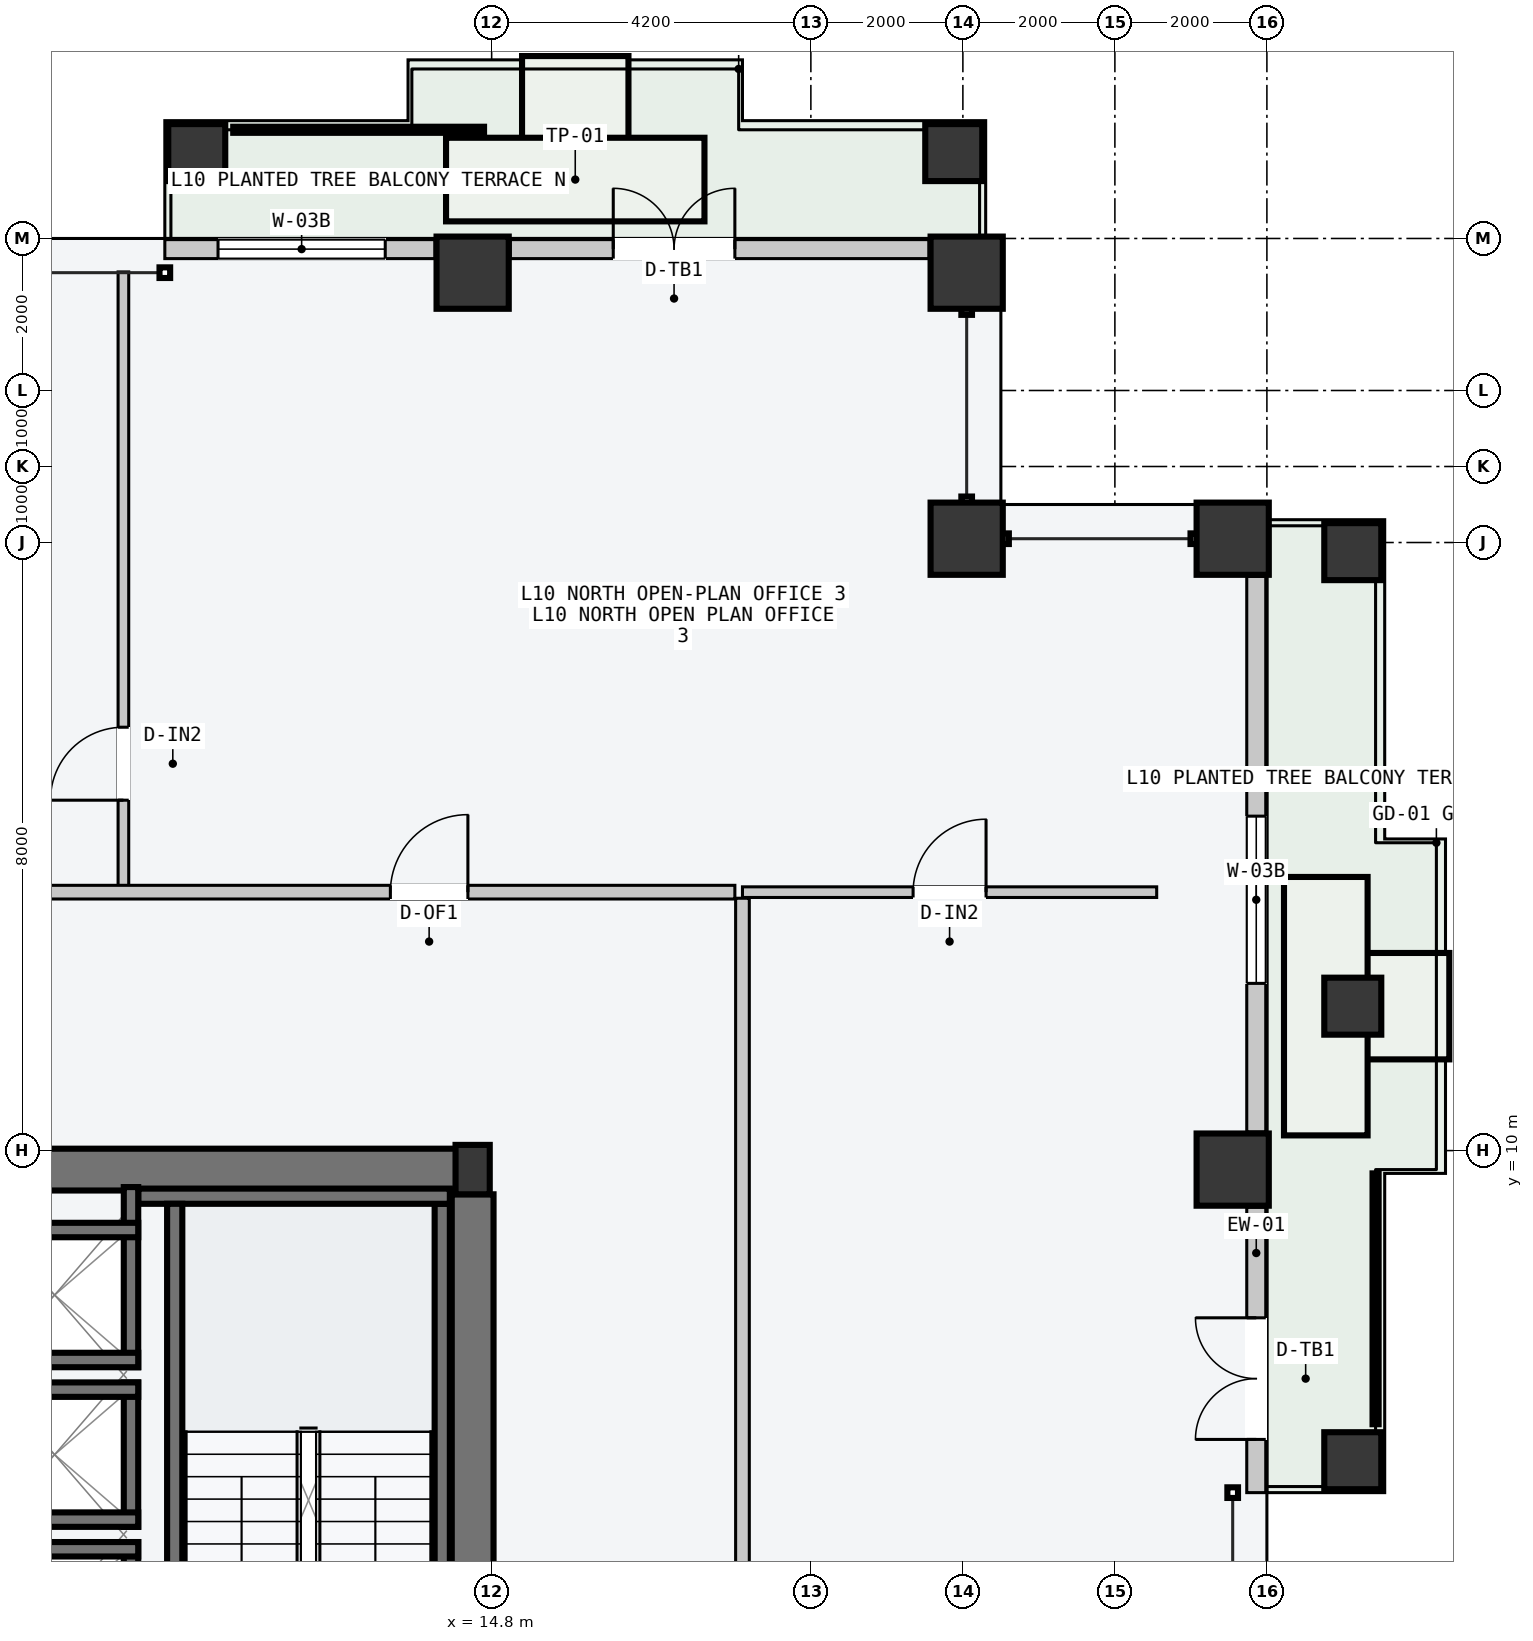
"""IFC4 building model, lengths in metres.
Left out: names, types, materials, properties, quantities, classifications, styles, units other than length and angle.
Written with IfcOpenShell. Run it as: python <this file> out.ifc"""

import sys

from ifc_helpers import new_model, si_unit, direction, frame, frame_2d, origin, origin_2d, place, context, subcontext, project, spatial, rectangle, hollow_rectangle, i_section, extrude, element, fill, save


model = new_model("IFC4")
c1 = context("Model", 3, precision=1e-05, world=origin(), true_north=direction((0.0, 1.0)))
c2 = subcontext(c1, "Body", "Model", "MODEL_VIEW")
j1 = project(units=[si_unit("LENGTHUNIT", "METRE"), si_unit("PLANEANGLEUNIT", "RADIAN")], contexts=[c1])
p1 = place(None, origin())
s1 = spatial("IfcSite", under=j1, at=p1, CompositionType="ELEMENT")
p2 = place(p1, origin())
s2 = spatial("IfcBuilding", under=s1, at=p2, CompositionType="ELEMENT")
p3 = place(p2, frame((0.0, 0.0, 42.0)))
s3 = spatial("IfcBuildingStorey", under=s2, at=p3, CompositionType="ELEMENT", Elevation=42.0)
p4 = place(p3, frame((8.07, 9.75, -0.2), z_axis=(0.0, 0.0, 1.0), x_axis=(1.0, 0.0, 0.0)))
e1 = element("IfcWall", 1, at=p4, inside=s3, PredefinedType="SHEAR", context=c2, shape_type="SweptSolid", body=[
    extrude(rectangle(XDim=6.46, YDim=0.55, at=frame_2d((3.23, 0.0))), origin(), (0.0, 0.0, 1.0), 3.6),
])
p5 = place(p3, frame((14.55, 0.325, -0.2), z_axis=(0.0, 0.0, 1.0), x_axis=(0.0, 1.0, 0.0)))
e2 = element("IfcWall", 2, at=p5, inside=s3, PredefinedType="SHEAR", context=c2, shape_type="SweptSolid", body=[
    extrude(rectangle(XDim=9.1, YDim=0.55, at=frame_2d((4.55, 0.0))), origin(), (0.0, 0.0, 1.0), 3.6),
])
p6 = place(p3, frame((14.15, 1.5, -0.2), z_axis=(0.0, 0.0, 1.0), x_axis=(0.0, 1.0, 0.0)))
e3 = element("IfcWall", 3, at=p6, inside=s3, PredefinedType="SOLIDWALL", context=c2, shape_type="SweptSolid", body=[
    extrude(rectangle(XDim=7.8, YDim=0.2, at=frame_2d((3.9, 0.0))), origin(), (0.0, 0.0, 1.0), 3.6),
])
p7 = place(p3, frame((10.15, 9.4, -0.2), z_axis=(0.0, 0.0, 1.0), x_axis=(1.0, 0.0, 0.0)))
e4 = element("IfcWall", 4, at=p7, inside=s3, PredefinedType="SOLIDWALL", context=c2, shape_type="SweptSolid", body=[
    extrude(rectangle(XDim=4.1, YDim=0.2, at=frame_2d((2.05, 0.0))), origin(), (0.0, 0.0, 1.0), 3.6),
])
p8 = place(p3, frame((10.63, 1.5, -0.2), z_axis=(0.0, 0.0, 1.0), x_axis=(0.0, 1.0, 0.0)))
e5 = element("IfcWall", 5, at=p8, inside=s3, PredefinedType="SOLIDWALL", context=c2, shape_type="SweptSolid", body=[
    extrude(rectangle(XDim=7.8, YDim=0.2, at=frame_2d((3.9, 0.0))), origin(), (0.0, 0.0, 1.0), 3.6),
])
p9 = place(p3, frame((14.55, 9.75, 0.0), z_axis=(0.0, 0.0, 1.0), x_axis=(1.0, 0.0, 0.0)))
e6 = element("IfcColumn", 6, at=p9, inside=s3, PredefinedType="COLUMN", context=c2, shape_type="SweptSolid", body=[
    extrude(i_section(OverallWidth=0.45, OverallDepth=0.65, WebThickness=0.025, FlangeThickness=0.04, at=origin_2d()), origin(), (0.0, 0.0, 1.0), 3.6),
])
for number, where, z_axis, x_axis in (
    (7, (14.55, 21.55, 0.0), (0.0, 0.0, 1.0), (1.0, 0.0, 0.0)),
    (8, (21.05, 21.55, 0.0), (0.0, 0.0, 1.0), (1.0, 0.0, 0.0)),
    (9, (24.55, 9.75, 0.0), (0.0, 0.0, 1.0), (0.0, 1.0, 0.0)),
    (10, (24.55, 18.05, 0.0), (0.0, 0.0, 1.0), (0.0, 1.0, 0.0)),
    (11, (21.05, 18.05, 0.0), (0.0, 0.0, 1.0), (1.0, 0.0, 0.0)),
):
    element("IfcColumn", number, at=place(p3, frame(where, z_axis=z_axis, x_axis=x_axis)), inside=s3, PredefinedType="COLUMN", context=c2, shape_type="SweptSolid", body=[
        extrude(hollow_rectangle(XDim=0.95, YDim=0.95, WallThickness=0.048, at=origin_2d()), origin(), (0.0, 0.0, 1.0), 3.6),
    ])
for number, where, z_axis, x_axis in (
    (12, (10.92, 23.13, 0.0), (0.0, 0.0, 1.0), (1.0, 0.0, 0.0)),
    (13, (20.88, 23.13, 0.0), (0.0, 0.0, 1.0), (1.0, 0.0, 0.0)),
    (14, (26.13, 5.92, 0.0), (0.0, 0.0, 1.0), (0.0, 1.0, 0.0)),
    (15, (26.13, 17.88, 0.0), (0.0, 0.0, 1.0), (0.0, 1.0, 0.0)),
    (16, (26.13, 11.9, 0.0), (0.0, 0.0, 1.0), (0.0, 1.0, 0.0)),
):
    element("IfcColumn", number, at=place(p3, frame(where, z_axis=z_axis, x_axis=x_axis)), inside=s3, PredefinedType="COLUMN", context=c2, shape_type="SweptSolid", body=[
        extrude(hollow_rectangle(XDim=0.75, YDim=0.75, WallThickness=0.032, at=origin_2d()), origin(), (0.0, 0.0, 1.0), 3.6),
    ])
p10 = place(p3, frame((10.5, 21.86, 0.0), z_axis=(0.0, 0.0, 1.0), x_axis=(1.0, 0.0, 0.0)))
e17 = element("IfcWall", 17, at=p10, inside=s3, PredefinedType="STANDARD", context=c2, shape_type="SweptSolid", body=[
    extrude(rectangle(XDim=3.555, YDim=0.25, at=frame_2d((1.777, 0.0))), origin(), (0.0, 0.0, 1.0), 3.4),
])
p11 = place(p10, frame((0.7, 0.0, 0.85)))
e18 = element("IfcOpeningElement", 18, at=p11, cuts=e17, PredefinedType="OPENING", context=c2, shape_type="SweptSolid", body=[
    extrude(rectangle(XDim=2.2, YDim=2.1, at=frame_2d((1.1, 1.05))), frame((0.0, 0.135, 0.0), z_axis=(0.0, -1.0, 0.0), x_axis=(1.0, 0.0, 0.0)), (0.0, 0.0, 1.0), 0.27),
])
p12 = place(p3, frame((15.045, 21.86, 0.0), z_axis=(0.0, 0.0, 1.0), x_axis=(1.0, 0.0, 0.0)))
e19 = element("IfcWall", 19, at=p12, inside=s3, PredefinedType="STANDARD", context=c2, shape_type="SweptSolid", body=[
    extrude(rectangle(XDim=5.51, YDim=0.25, at=frame_2d((2.755, 0.0))), origin(), (0.0, 0.0, 1.0), 3.4),
])
p13 = place(p12, frame((1.355, 0.0, 0.0)))
e20 = element("IfcOpeningElement", 20, at=p13, cuts=e19, PredefinedType="OPENING", context=c2, shape_type="SweptSolid", body=[
    extrude(rectangle(XDim=1.6, YDim=2.2, at=frame_2d((0.8, 1.1))), frame((0.0, 0.135, 0.0), z_axis=(0.0, -1.0, 0.0), x_axis=(1.0, 0.0, 0.0)), (0.0, 0.0, 1.0), 0.27),
])
p14 = place(p3, frame((24.86, 5.5, 0.0), z_axis=(0.0, 0.0, 1.0), x_axis=(0.0, 1.0, 0.0)))
e21 = element("IfcWall", 21, at=p14, inside=s3, PredefinedType="STANDARD", context=c2, shape_type="SweptSolid", body=[
    extrude(rectangle(XDim=3.755, YDim=0.25, at=frame_2d((1.877, 0.0))), origin(), (0.0, 0.0, 1.0), 3.4),
])
p15 = place(p14, frame((0.7, 0.0, 0.0)))
e22 = element("IfcOpeningElement", 22, at=p15, cuts=e21, PredefinedType="OPENING", context=c2, shape_type="SweptSolid", body=[
    extrude(rectangle(XDim=1.6, YDim=2.2, at=frame_2d((0.8, 1.1))), frame((0.0, 0.135, 0.0), z_axis=(0.0, -1.0, 0.0), x_axis=(1.0, 0.0, 0.0)), (0.0, 0.0, 1.0), 0.27),
])
p16 = place(p3, frame((24.86, 10.245, 0.0), z_axis=(0.0, 0.0, 1.0), x_axis=(0.0, 1.0, 0.0)))
e23 = element("IfcWall", 23, at=p16, inside=s3, PredefinedType="STANDARD", context=c2, shape_type="SweptSolid", body=[
    extrude(rectangle(XDim=7.31, YDim=0.25, at=frame_2d((3.655, 0.0))), origin(), (0.0, 0.0, 1.0), 3.4),
])
p17 = place(p16, frame((1.955, 0.0, 0.85)))
e24 = element("IfcOpeningElement", 24, at=p17, cuts=e23, PredefinedType="OPENING", context=c2, shape_type="SweptSolid", body=[
    extrude(rectangle(XDim=2.2, YDim=2.1, at=frame_2d((1.1, 1.05))), frame((0.0, 0.135, 0.0), z_axis=(0.0, -1.0, 0.0), x_axis=(1.0, 0.0, 0.0)), (0.0, 0.0, 1.0), 0.27),
])
p18 = place(p3, frame((10.055, 2.95, -0.2), z_axis=(0.0, 0.0, 1.0), x_axis=(0.0, 1.0, 0.0)))
e25 = element("IfcWall", 25, at=p18, inside=s3, PredefinedType="SOLIDWALL", context=c2, shape_type="SweptSolid", body=[
    extrude(rectangle(XDim=1.9, YDim=0.19, at=frame_2d((0.95, 0.0))), origin(), (0.0, 0.0, 1.0), 3.6),
])
p19 = place(p3, frame((7.95, 4.755, -0.2), z_axis=(0.0, 0.0, 1.0), x_axis=(1.0, 0.0, 0.0)))
e26 = element("IfcWall", 26, at=p19, inside=s3, PredefinedType="SOLIDWALL", context=c2, shape_type="SweptSolid", body=[
    extrude(rectangle(XDim=2.2, YDim=0.19, at=frame_2d((1.1, 0.0))), origin(), (0.0, 0.0, 1.0), 3.6),
])
p20 = place(p3, frame((10.055, 5.05, -0.2), z_axis=(0.0, 0.0, 1.0), x_axis=(0.0, 1.0, 0.0)))
e27 = element("IfcWall", 27, at=p20, inside=s3, PredefinedType="SOLIDWALL", context=c2, shape_type="SweptSolid", body=[
    extrude(rectangle(XDim=1.9, YDim=0.19, at=frame_2d((0.95, 0.0))), origin(), (0.0, 0.0, 1.0), 3.6),
])
for number, where, z_axis, x_axis in (
    (28, (7.95, 6.855, -0.2), (0.0, 0.0, 1.0), (1.0, 0.0, 0.0)),
    (29, (7.95, 5.145, -0.2), (0.0, 0.0, 1.0), (1.0, 0.0, 0.0)),
):
    element("IfcWall", number, at=place(p3, frame(where, z_axis=z_axis, x_axis=x_axis)), inside=s3, PredefinedType="SOLIDWALL", context=c2, shape_type="SweptSolid", body=[
        extrude(rectangle(XDim=2.2, YDim=0.19, at=frame_2d((1.1, 0.0))), origin(), (0.0, 0.0, 1.0), 3.6),
    ])
p21 = place(p3, frame((10.055, 7.15, -0.2), z_axis=(0.0, 0.0, 1.0), x_axis=(0.0, 1.0, 0.0)))
e30 = element("IfcWall", 30, at=p21, inside=s3, PredefinedType="SOLIDWALL", context=c2, shape_type="SweptSolid", body=[
    extrude(rectangle(XDim=2.37, YDim=0.19, at=frame_2d((1.185, 0.0))), origin(), (0.0, 0.0, 1.0), 3.6),
])
for number, where, z_axis, x_axis in (
    (31, (7.95, 8.955, -0.2), (0.0, 0.0, 1.0), (1.0, 0.0, 0.0)),
    (32, (7.95, 7.245, -0.2), (0.0, 0.0, 1.0), (1.0, 0.0, 0.0)),
):
    element("IfcWall", number, at=place(p3, frame(where, z_axis=z_axis, x_axis=x_axis)), inside=s3, PredefinedType="SOLIDWALL", context=c2, shape_type="SweptSolid", body=[
        extrude(rectangle(XDim=2.2, YDim=0.19, at=frame_2d((1.1, 0.0))), origin(), (0.0, 0.0, 1.0), 3.6),
    ])
p22 = place(p3, frame((9.955, 13.46, 0.0), z_axis=(0.0, 0.0, 1.0), x_axis=(0.0, 1.0, 0.0)))
e33 = element("IfcWall", 33, at=p22, inside=s3, PredefinedType="PARTITIONING", context=c2, shape_type="SweptSolid", body=[
    extrude(rectangle(XDim=8.1, YDim=0.14, at=frame_2d((4.05, 0.0))), origin(), (0.0, 0.0, 1.0), 3.4),
])
p23 = place(p22, frame((1.15, 0.0, 0.0)))
e34 = element("IfcOpeningElement", 34, at=p23, cuts=e33, PredefinedType="OPENING", context=c2, shape_type="SweptSolid", body=[
    extrude(rectangle(XDim=0.96, YDim=2.18, at=frame_2d((0.48, 1.09))), frame((0.0, 0.08, 0.0), z_axis=(0.0, -1.0, 0.0), x_axis=(1.0, 0.0, 0.0)), (0.0, 0.0, 1.0), 0.16),
])
p24 = place(p3, frame((-18.0, 13.4, 0.0), z_axis=(0.0, 0.0, 1.0), x_axis=(1.0, 0.0, 0.0)))
e35 = element("IfcWall", 35, at=p24, inside=s3, PredefinedType="PARTITIONING", context=c2, shape_type="SweptSolid", body=[
    extrude(rectangle(XDim=36.0, YDim=0.18, at=frame_2d((18.0, 0.0))), origin(), (0.0, 0.0, 1.0), 3.4),
])
p25 = place(p24, frame((7.355, 0.0, 0.0)))
e36 = element("IfcOpeningElement", 36, at=p25, cuts=e35, PredefinedType="OPENING", context=c2, shape_type="SweptSolid", body=[
    extrude(rectangle(XDim=0.9, YDim=2.15, at=frame_2d((0.45, 1.075))), frame((0.0, 0.1, 0.0), z_axis=(0.0, -1.0, 0.0), x_axis=(1.0, 0.0, 0.0)), (0.0, 0.0, 1.0), 0.2),
])
p26 = place(p24, frame((21.303, 0.0, 0.0)))
e37 = element("IfcOpeningElement", 37, at=p26, cuts=e35, PredefinedType="OPENING", context=c2, shape_type="SweptSolid", body=[
    extrude(rectangle(XDim=0.96, YDim=2.18, at=frame_2d((0.48, 1.09))), frame((0.0, 0.1, 0.0), z_axis=(0.0, -1.0, 0.0), x_axis=(1.0, 0.0, 0.0)), (0.0, 0.0, 1.0), 0.2),
])
p27 = place(p24, frame((31.468, 0.0, 0.0)))
e38 = element("IfcOpeningElement", 38, at=p27, cuts=e35, PredefinedType="OPENING", context=c2, shape_type="SweptSolid", body=[
    extrude(rectangle(XDim=1.02, YDim=2.2, at=frame_2d((0.51, 1.1))), frame((0.0, 0.1, 0.0), z_axis=(0.0, -1.0, 0.0), x_axis=(1.0, 0.0, 0.0)), (0.0, 0.0, 1.0), 0.2),
])
p28 = place(p3, frame((18.1, 13.4, 0.0), z_axis=(0.0, 0.0, 1.0), x_axis=(1.0, 0.0, 0.0)))
e39 = element("IfcWall", 39, at=p28, inside=s3, PredefinedType="PARTITIONING", context=c2, shape_type="SweptSolid", body=[
    extrude(rectangle(XDim=5.45, YDim=0.14, at=frame_2d((2.725, 0.0))), origin(), (0.0, 0.0, 1.0), 3.4),
])
p29 = place(p28, frame((2.245, 0.0, 0.0)))
e40 = element("IfcOpeningElement", 40, at=p29, cuts=e39, PredefinedType="OPENING", context=c2, shape_type="SweptSolid", body=[
    extrude(rectangle(XDim=0.96, YDim=2.18, at=frame_2d((0.48, 1.09))), frame((0.0, 0.08, 0.0), z_axis=(0.0, -1.0, 0.0), x_axis=(1.0, 0.0, 0.0)), (0.0, 0.0, 1.0), 0.16),
])
p30 = place(p3, frame((18.1, -13.32, 0.0), z_axis=(0.0, 0.0, 1.0), x_axis=(0.0, 1.0, 0.0)))
e41 = element("IfcWall", 41, at=p30, inside=s3, PredefinedType="PARTITIONING", context=c2, shape_type="SweptSolid", body=[
    extrude(rectangle(XDim=26.64, YDim=0.18, at=frame_2d((13.32, 0.0))), origin(), (0.0, 0.0, 1.0), 3.4),
])
p31 = place(p30, frame((12.84, 0.0, 0.0)))
e42 = element("IfcOpeningElement", 42, at=p31, cuts=e41, PredefinedType="OPENING", context=c2, shape_type="SweptSolid", body=[
    extrude(rectangle(XDim=0.96, YDim=2.18, at=frame_2d((0.48, 1.09))), frame((0.0, 0.1, 0.0), z_axis=(0.0, -1.0, 0.0), x_axis=(1.0, 0.0, 0.0)), (0.0, 0.0, 1.0), 0.2),
])
p32 = place(p11, origin())
e43 = element("IfcWindow", 43, at=p32, inside=s3, PartitioningType="SINGLE_PANEL", PredefinedType="WINDOW", context=c2, shape_type="SweptSolid", body=[
    extrude(rectangle(XDim=2.2, YDim=2.1, at=frame_2d((1.1, 1.05))), frame((0.0, 0.03, 0.0), z_axis=(0.0, -1.0, 0.0), x_axis=(1.0, 0.0, 0.0)), (0.0, 0.0, 1.0), 0.06),
])
fill(e18, e43)
p33 = place(p13, origin())
e44 = element("IfcDoor", 44, at=p33, inside=s3, OperationType="DOUBLE_DOOR_SINGLE_SWING", PredefinedType="DOOR", context=c2, shape_type="SweptSolid", body=[
    extrude(rectangle(XDim=1.6, YDim=2.2, at=frame_2d((0.8, 1.1))), frame((0.0, 0.025, 0.0), z_axis=(0.0, -1.0, 0.0), x_axis=(1.0, 0.0, 0.0)), (0.0, 0.0, 1.0), 0.05),
])
fill(e20, e44)
p34 = place(p15, origin())
e45 = element("IfcDoor", 45, at=p34, inside=s3, OperationType="DOUBLE_DOOR_SINGLE_SWING", PredefinedType="DOOR", context=c2, shape_type="SweptSolid", body=[
    extrude(rectangle(XDim=1.6, YDim=2.2, at=frame_2d((0.8, 1.1))), frame((0.0, 0.025, 0.0), z_axis=(0.0, -1.0, 0.0), x_axis=(1.0, 0.0, 0.0)), (0.0, 0.0, 1.0), 0.05),
])
fill(e22, e45)
p35 = place(p17, origin())
e46 = element("IfcWindow", 46, at=p35, inside=s3, PartitioningType="SINGLE_PANEL", PredefinedType="WINDOW", context=c2, shape_type="SweptSolid", body=[
    extrude(rectangle(XDim=2.2, YDim=2.1, at=frame_2d((1.1, 1.05))), frame((0.0, 0.03, 0.0), z_axis=(0.0, -1.0, 0.0), x_axis=(1.0, 0.0, 0.0)), (0.0, 0.0, 1.0), 0.06),
])
fill(e24, e46)
p36 = place(p23, origin())
e47 = element("IfcDoor", 47, at=p36, inside=s3, OperationType="SINGLE_SWING_LEFT", PredefinedType="DOOR", context=c2, shape_type="SweptSolid", body=[
    extrude(rectangle(XDim=0.96, YDim=2.18, at=frame_2d((0.48, 1.09))), frame((0.0, 0.025, 0.0), z_axis=(0.0, -1.0, 0.0), x_axis=(1.0, 0.0, 0.0)), (0.0, 0.0, 1.0), 0.05),
])
fill(e34, e47)
p37 = place(p27, origin())
e48 = element("IfcDoor", 48, at=p37, inside=s3, OperationType="SINGLE_SWING_RIGHT", PredefinedType="DOOR", context=c2, shape_type="SweptSolid", body=[
    extrude(rectangle(XDim=1.02, YDim=2.2, at=frame_2d((0.51, 1.1))), frame((0.0, 0.025, 0.0), z_axis=(0.0, -1.0, 0.0), x_axis=(1.0, 0.0, 0.0)), (0.0, 0.0, 1.0), 0.05),
])
fill(e38, e48)
p38 = place(p29, origin())
e49 = element("IfcDoor", 49, at=p38, inside=s3, OperationType="SINGLE_SWING_RIGHT", PredefinedType="DOOR", context=c2, shape_type="SweptSolid", body=[
    extrude(rectangle(XDim=0.96, YDim=2.18, at=frame_2d((0.48, 1.09))), frame((0.0, 0.025, 0.0), z_axis=(0.0, -1.0, 0.0), x_axis=(1.0, 0.0, 0.0)), (0.0, 0.0, 1.0), 0.05),
])
fill(e40, e49)
save(model, sys.argv[1])
